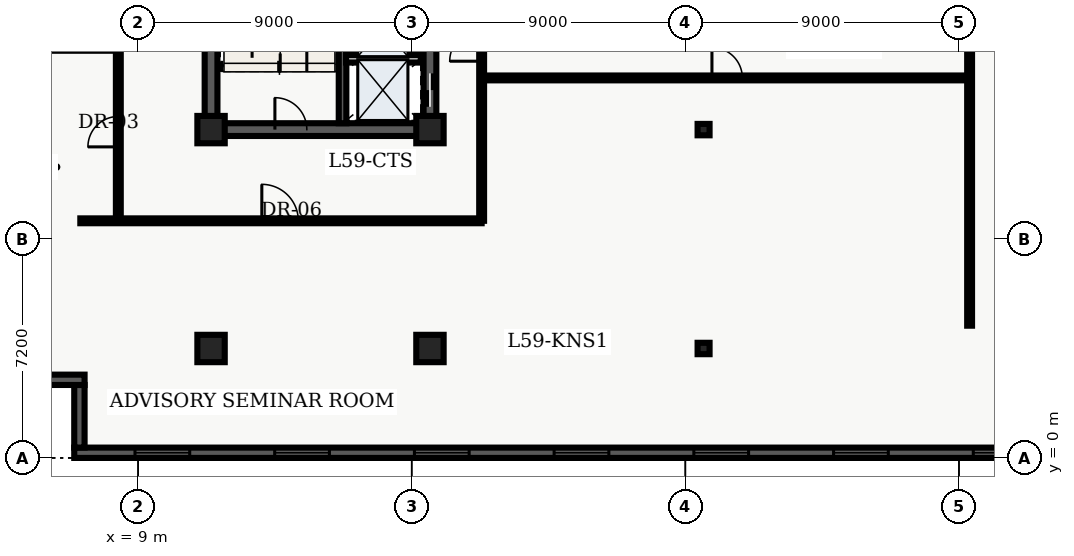
"""IFC4 building model, lengths in metres.
Left out: names, types, materials, properties, quantities, classifications, styles, units other than length and angle.
Written with IfcOpenShell. Run it as: python <this file> out.ifc"""

import sys

from ifc_helpers import new_model, entity, si_unit, converted_unit, direction, frame, origin_with_axes, origin_2d_with_axis, place, context, subcontext, project, spatial, polyline, rectangle, i_section, outline, extrude, element, fill, save


model = new_model("IFC4")
c1 = context("Model", 3, precision=1e-05, world=origin_with_axes(), true_north=direction((0.0, 1.0)))
c2 = subcontext(c1, "Body", "Model", "MODEL_VIEW")
j1 = project(units=[si_unit("LENGTHUNIT", "METRE"), converted_unit("PLANEANGLEUNIT", "DEGREE", entity("IfcPlaneAngleMeasure", 0.017), si_unit("PLANEANGLEUNIT", "RADIAN"), dimensions=[0, 0, 0, 0, 0, 0, 0])], contexts=[c1])
p1 = place(None, origin_with_axes())
s1 = spatial("IfcSite", under=j1, at=p1, CompositionType="ELEMENT")
p2 = place(p1, origin_with_axes())
s2 = spatial("IfcBuilding", under=s1, at=p2, CompositionType="ELEMENT")
p3 = place(p2, frame((0.0, 0.0, 240.3), z_axis=(0.0, 0.0, 1.0), x_axis=(1.0, 0.0, 0.0)))
s3 = spatial("IfcBuildingStorey", under=s2, at=p3, CompositionType="ELEMENT", Elevation=240.3)
p4 = place(p3, frame((11.4, 10.8, 0.0), z_axis=(0.0, 0.0, 1.0), x_axis=(0.0, 1.0, 0.0)))
e1 = element("IfcWall", 1, at=p4, inside=s3, PredefinedType="SHEAR", context=c2, shape_type="SweptSolid", body=[
    extrude(outline(polyline([(0.0, -0.21), (27.0, -0.21), (27.0, 0.21), (0.0, 0.21), (0.0, -0.21)])), origin_with_axes(), (0.0, 0.0, 1.0), 3.66),
])
p5 = place(p3, frame((11.4, 10.8, 0.0), z_axis=(0.0, 0.0, 1.0), x_axis=(1.0, 0.0, 0.0)))
e2 = element("IfcWall", 2, at=p5, inside=s3, PredefinedType="SHEAR", context=c2, shape_type="SweptSolid", body=[
    extrude(outline(polyline([(0.0, -0.21), (7.2, -0.21), (7.2, 0.21), (0.0, 0.21), (0.0, -0.21)])), origin_with_axes(), (0.0, 0.0, 1.0), 3.66),
])
p6 = place(p5, frame((2.625, 0.0, 0.0), z_axis=(0.0, 0.0, 1.0), x_axis=(1.0, 0.0, 0.0)))
e3 = element("IfcOpeningElement", 3, at=p6, cuts=e2, PredefinedType="OPENING", context=c2, shape_type="SweptSolid", body=[
    extrude(rectangle(XDim=1.05, YDim=0.44, at=origin_2d_with_axis()), origin_with_axes(), (0.0, 0.0, 1.0), 2.15),
])
p7 = place(p3, frame((18.6, 10.8, 0.0), z_axis=(0.0, 0.0, 1.0), x_axis=(0.0, 1.0, 0.0)))
e4 = element("IfcWall", 4, at=p7, inside=s3, PredefinedType="SHEAR", context=c2, shape_type="SweptSolid", body=[
    extrude(outline(polyline([(0.0, -0.21), (13.5, -0.21), (13.5, 0.21), (0.0, 0.21), (0.0, -0.21)])), origin_with_axes(), (0.0, 0.0, 1.0), 3.66),
])
p8 = place(p7, frame((1.3, 0.0, 0.0), z_axis=(0.0, 0.0, 1.0), x_axis=(1.0, 0.0, 0.0)))
e5 = element("IfcOpeningElement", 5, at=p8, cuts=e4, PredefinedType="OPENING", context=c2, shape_type="SweptSolid", body=[
    extrude(rectangle(XDim=1.1, YDim=0.44, at=origin_2d_with_axis()), origin_with_axes(), (0.0, 0.0, 1.0), 2.15),
])
p9 = place(p7, frame((3.4, 0.0, 0.0), z_axis=(0.0, 0.0, 1.0), x_axis=(1.0, 0.0, 0.0)))
e6 = element("IfcOpeningElement", 6, at=p9, cuts=e4, PredefinedType="OPENING", context=c2, shape_type="SweptSolid", body=[
    extrude(rectangle(XDim=1.1, YDim=0.44, at=origin_2d_with_axis()), origin_with_axes(), (0.0, 0.0, 1.0), 2.15),
])
p10 = place(p7, frame((11.125, 0.0, 0.0), z_axis=(0.0, 0.0, 1.0), x_axis=(1.0, 0.0, 0.0)))
e7 = element("IfcOpeningElement", 7, at=p10, cuts=e4, PredefinedType="OPENING", context=c2, shape_type="SweptSolid", body=[
    extrude(rectangle(XDim=1.05, YDim=0.44, at=origin_2d_with_axis()), origin_with_axes(), (0.0, 0.0, 1.0), 2.15),
])
p11 = place(p7, frame((6.675, 0.0, 0.0), z_axis=(0.0, 0.0, 1.0), x_axis=(1.0, 0.0, 0.0)))
e8 = element("IfcOpeningElement", 8, at=p11, cuts=e4, PredefinedType="OPENING", context=c2, shape_type="SweptSolid", body=[
    extrude(rectangle(XDim=0.95, YDim=0.44, at=origin_2d_with_axis()), origin_with_axes(), (0.0, 0.0, 1.0), 2.15),
])
p12 = place(p3, frame((15.725, 11.01, 0.0), z_axis=(0.0, 0.0, 1.0), x_axis=(0.0, 1.0, 0.0)))
e9 = element("IfcWall", 9, at=p12, inside=s3, PredefinedType="SHEAR", context=c2, shape_type="SweptSolid", body=[
    extrude(outline(polyline([(0.0, -0.125), (8.69, -0.125), (8.69, 0.125), (0.0, 0.125), (0.0, -0.125)])), origin_with_axes(), (0.0, 0.0, 1.0), 3.66),
])
for number, where, z_axis, x_axis in (
    (10, (11.4, 3.6, 0.0), (0.0, 0.0, 1.0), (1.0, 0.0, 0.0)),
    (11, (11.4, 10.8, 0.0), (0.0, 0.0, 1.0), (1.0, 0.0, 0.0)),
    (12, (18.6, 3.6, 0.0), (0.0, 0.0, 1.0), (1.0, 0.0, 0.0)),
    (13, (18.6, 10.8, 0.0), (0.0, 0.0, 1.0), (1.0, 0.0, 0.0)),
):
    element("IfcColumn", number, at=place(p3, frame(where, z_axis=z_axis, x_axis=x_axis)), inside=s3, PredefinedType="COLUMN", context=c2, shape_type="SweptSolid", body=[
        extrude(rectangle(XDim=0.9, YDim=0.9, at=origin_2d_with_axis()), origin_with_axes(), (0.0, 0.0, 1.0), 3.9),
    ])
for number, where, z_axis, x_axis in (
    (14, (27.6, 3.6, 0.0), (0.0, 0.0, 1.0), (1.0, 0.0, 0.0)),
    (15, (27.6, 10.8, 0.0), (0.0, 0.0, 1.0), (1.0, 0.0, 0.0)),
):
    element("IfcColumn", number, at=place(p3, frame(where, z_axis=z_axis, x_axis=x_axis)), inside=s3, PredefinedType="COLUMN", context=c2, shape_type="SweptSolid", body=[
        extrude(i_section(OverallWidth=0.394, OverallDepth=0.375, WebThickness=0.017, FlangeThickness=0.028, FilletRadius=0.02, at=origin_2d_with_axis()), origin_with_axes(), (0.0, 0.0, 1.0), 3.9),
    ])
p13 = place(p3, frame((15.84, 13.13, 0.0), z_axis=(0.0, 0.0, 1.0), x_axis=(1.0, 0.0, 0.0)))
e16 = element("IfcWall", 16, at=p13, inside=s3, PredefinedType="SOLIDWALL", context=c2, shape_type="SweptSolid", body=[
    extrude(outline(polyline([(0.0, -0.125), (2.46, -0.125), (2.46, 0.125), (0.0, 0.125), (0.0, -0.125)])), origin_with_axes(), (0.0, 0.0, 1.0), 2.7),
])
p14 = place(p3, frame((7.1, 7.8, 0.0), z_axis=(0.0, 0.0, 1.0), x_axis=(1.0, 0.0, 0.0)))
e17 = element("IfcWall", 17, at=p14, inside=s3, PredefinedType="PARTITIONING", context=c2, shape_type="SweptSolid", body=[
    extrude(outline(polyline([(0.0, -0.08), (13.2, -0.08), (13.2, 0.08), (0.0, 0.08), (0.0, -0.08)])), origin_with_axes(), (0.0, 0.0, 1.0), 2.7),
])
p15 = place(p14, frame((6.57, 0.0, 0.0), z_axis=(0.0, 0.0, 1.0), x_axis=(1.0, 0.0, 0.0)))
e18 = element("IfcOpeningElement", 18, at=p15, cuts=e17, PredefinedType="OPENING", context=c2, shape_type="SweptSolid", body=[
    extrude(rectangle(XDim=1.2, YDim=0.18, at=origin_2d_with_axis()), origin_with_axes(), (0.0, 0.0, 1.0), 2.2),
])
p16 = place(p3, frame((20.3, 7.8, 0.0), z_axis=(0.0, 0.0, 1.0), x_axis=(0.0, 1.0, 0.0)))
e19 = element("IfcWall", 19, at=p16, inside=s3, PredefinedType="PARTITIONING", context=c2, shape_type="SweptSolid", body=[
    extrude(outline(polyline([(0.0, -0.08), (32.7, -0.08), (32.7, 0.08), (0.0, 0.08), (0.0, -0.08)])), origin_with_axes(), (0.0, 0.0, 1.0), 2.7),
])
p17 = place(p16, frame((14.55, 0.0, 0.0), z_axis=(0.0, 0.0, 1.0), x_axis=(1.0, 0.0, 0.0)))
e20 = element("IfcOpeningElement", 20, at=p17, cuts=e19, PredefinedType="OPENING", context=c2, shape_type="SweptSolid", body=[
    extrude(rectangle(XDim=0.9, YDim=0.18, at=origin_2d_with_axis()), origin_with_axes(), (0.0, 0.0, 1.0), 2.15),
])
p18 = place(p16, frame((18.86, 0.0, 0.0), z_axis=(0.0, 0.0, 1.0), x_axis=(1.0, 0.0, 0.0)))
e21 = element("IfcOpeningElement", 21, at=p18, cuts=e19, PredefinedType="OPENING", context=c2, shape_type="SweptSolid", body=[
    extrude(rectangle(XDim=1.0, YDim=0.18, at=origin_2d_with_axis()), origin_with_axes(), (0.0, 0.0, 1.0), 2.15),
])
p19 = place(p16, frame((24.276, 0.0, 0.0), z_axis=(0.0, 0.0, 1.0), x_axis=(1.0, 0.0, 0.0)))
e22 = element("IfcOpeningElement", 22, at=p19, cuts=e19, PredefinedType="OPENING", context=c2, shape_type="SweptSolid", body=[
    extrude(rectangle(XDim=1.0, YDim=0.18, at=origin_2d_with_axis()), origin_with_axes(), (0.0, 0.0, 1.0), 2.15),
])
p20 = place(p16, frame((27.491, 0.0, 0.0), z_axis=(0.0, 0.0, 1.0), x_axis=(1.0, 0.0, 0.0)))
e23 = element("IfcOpeningElement", 23, at=p20, cuts=e19, PredefinedType="OPENING", context=c2, shape_type="SweptSolid", body=[
    extrude(rectangle(XDim=1.0, YDim=0.18, at=origin_2d_with_axis()), origin_with_axes(), (0.0, 0.0, 1.0), 2.15),
])
p21 = place(p16, frame((5.775, 0.0, 0.0), z_axis=(0.0, 0.0, 1.0), x_axis=(1.0, 0.0, 0.0)))
e24 = element("IfcOpeningElement", 24, at=p21, cuts=e19, PredefinedType="OPENING", context=c2, shape_type="SweptSolid", body=[
    extrude(rectangle(XDim=1.05, YDim=0.18, at=origin_2d_with_axis()), origin_with_axes(), (0.0, 0.0, 1.0), 2.15),
])
p22 = place(p3, frame((8.35, 7.8, 0.0), z_axis=(0.0, 0.0, 1.0), x_axis=(0.0, 1.0, 0.0)))
e25 = element("IfcWall", 25, at=p22, inside=s3, PredefinedType="PARTITIONING", context=c2, shape_type="SweptSolid", body=[
    extrude(outline(polyline([(0.0, -0.08), (12.6, -0.08), (12.6, 0.08), (0.0, 0.08), (0.0, -0.08)])), origin_with_axes(), (0.0, 0.0, 1.0), 2.7),
])
p23 = place(p22, frame((2.932, 0.0, 0.0), z_axis=(0.0, 0.0, 1.0), x_axis=(1.0, 0.0, 0.0)))
e26 = element("IfcOpeningElement", 26, at=p23, cuts=e25, PredefinedType="OPENING", context=c2, shape_type="SweptSolid", body=[
    extrude(rectangle(XDim=1.0, YDim=0.18, at=origin_2d_with_axis()), origin_with_axes(), (0.0, 0.0, 1.0), 2.15),
])
p24 = place(p22, frame((9.127, 0.0, 0.0), z_axis=(0.0, 0.0, 1.0), x_axis=(1.0, 0.0, 0.0)))
e27 = element("IfcOpeningElement", 27, at=p24, cuts=e25, PredefinedType="OPENING", context=c2, shape_type="SweptSolid", body=[
    extrude(rectangle(XDim=1.0, YDim=0.18, at=origin_2d_with_axis()), origin_with_axes(), (0.0, 0.0, 1.0), 2.15),
])
p25 = place(p3, frame((20.3, 12.5, 0.0), z_axis=(0.0, 0.0, 1.0), x_axis=(1.0, 0.0, 0.0)))
e28 = element("IfcWall", 28, at=p25, inside=s3, PredefinedType="PARTITIONING", context=c2, shape_type="SweptSolid", body=[
    extrude(outline(polyline([(0.0, -0.08), (16.05, -0.08), (16.05, 0.08), (0.0, 0.08), (0.0, -0.08)])), origin_with_axes(), (0.0, 0.0, 1.0), 2.7),
])
p26 = place(p25, frame((8.075, 0.0, 0.0), z_axis=(0.0, 0.0, 1.0), x_axis=(1.0, 0.0, 0.0)))
e29 = element("IfcOpeningElement", 29, at=p26, cuts=e28, PredefinedType="OPENING", context=c2, shape_type="SweptSolid", body=[
    extrude(rectangle(XDim=1.0, YDim=0.18, at=origin_2d_with_axis()), origin_with_axes(), (0.0, 0.0, 1.0), 2.15),
])
p27 = place(p3, frame((36.35, 4.35, 0.0), z_axis=(0.0, 0.0, 1.0), x_axis=(0.0, 1.0, 0.0)))
e30 = element("IfcWall", 30, at=p27, inside=s3, PredefinedType="PARTITIONING", context=c2, shape_type="SweptSolid", body=[
    extrude(outline(polyline([(0.0, -0.08), (16.95, -0.08), (16.95, 0.08), (0.0, 0.08), (0.0, -0.08)])), origin_with_axes(), (0.0, 0.0, 1.0), 2.7),
])
p28 = place(p3, frame((49.46, 0.17, 0.0), z_axis=(0.0, 0.0, 1.0), x_axis=(-1.0, 0.0, 0.0)))
e31 = element("IfcWall", 31, at=p28, inside=s3, PredefinedType="SOLIDWALL", context=c2, shape_type="SweptSolid", body=[
    extrude(outline(polyline([(0.0, -0.17), (42.56, -0.17), (42.56, 0.17), (0.0, 0.17), (0.0, -0.17)])), origin_with_axes(), (0.0, 0.0, 1.0), 3.66),
])
p29 = place(p28, frame((2.898, 0.0, 0.45), z_axis=(0.0, 0.0, 1.0), x_axis=(1.0, 0.0, 0.0)))
e32 = element("IfcOpeningElement", 32, at=p29, cuts=e31, PredefinedType="OPENING", context=c2, shape_type="SweptSolid", body=[
    extrude(rectangle(XDim=1.8, YDim=0.36, at=origin_2d_with_axis()), origin_with_axes(), (0.0, 0.0, 1.0), 2.1),
])
p30 = place(p28, frame((7.493, 0.0, 0.45), z_axis=(0.0, 0.0, 1.0), x_axis=(1.0, 0.0, 0.0)))
e33 = element("IfcOpeningElement", 33, at=p30, cuts=e31, PredefinedType="OPENING", context=c2, shape_type="SweptSolid", body=[
    extrude(rectangle(XDim=1.8, YDim=0.36, at=origin_2d_with_axis()), origin_with_axes(), (0.0, 0.0, 1.0), 2.1),
])
p31 = place(p28, frame((12.089, 0.0, 0.45), z_axis=(0.0, 0.0, 1.0), x_axis=(1.0, 0.0, 0.0)))
e34 = element("IfcOpeningElement", 34, at=p31, cuts=e31, PredefinedType="OPENING", context=c2, shape_type="SweptSolid", body=[
    extrude(rectangle(XDim=1.8, YDim=0.36, at=origin_2d_with_axis()), origin_with_axes(), (0.0, 0.0, 1.0), 2.1),
])
p32 = place(p28, frame((16.684, 0.0, 0.45), z_axis=(0.0, 0.0, 1.0), x_axis=(1.0, 0.0, 0.0)))
e35 = element("IfcOpeningElement", 35, at=p32, cuts=e31, PredefinedType="OPENING", context=c2, shape_type="SweptSolid", body=[
    extrude(rectangle(XDim=1.8, YDim=0.36, at=origin_2d_with_axis()), origin_with_axes(), (0.0, 0.0, 1.0), 2.1),
])
p33 = place(p28, frame((21.28, 0.0, 0.45), z_axis=(0.0, 0.0, 1.0), x_axis=(1.0, 0.0, 0.0)))
e36 = element("IfcOpeningElement", 36, at=p33, cuts=e31, PredefinedType="OPENING", context=c2, shape_type="SweptSolid", body=[
    extrude(rectangle(XDim=1.8, YDim=0.36, at=origin_2d_with_axis()), origin_with_axes(), (0.0, 0.0, 1.0), 2.1),
])
p34 = place(p28, frame((25.876, 0.0, 0.45), z_axis=(0.0, 0.0, 1.0), x_axis=(1.0, 0.0, 0.0)))
e37 = element("IfcOpeningElement", 37, at=p34, cuts=e31, PredefinedType="OPENING", context=c2, shape_type="SweptSolid", body=[
    extrude(rectangle(XDim=1.8, YDim=0.36, at=origin_2d_with_axis()), origin_with_axes(), (0.0, 0.0, 1.0), 2.1),
])
p35 = place(p28, frame((30.471, 0.0, 0.45), z_axis=(0.0, 0.0, 1.0), x_axis=(1.0, 0.0, 0.0)))
e38 = element("IfcOpeningElement", 38, at=p35, cuts=e31, PredefinedType="OPENING", context=c2, shape_type="SweptSolid", body=[
    extrude(rectangle(XDim=1.8, YDim=0.36, at=origin_2d_with_axis()), origin_with_axes(), (0.0, 0.0, 1.0), 2.1),
])
p36 = place(p28, frame((35.067, 0.0, 0.45), z_axis=(0.0, 0.0, 1.0), x_axis=(1.0, 0.0, 0.0)))
e39 = element("IfcOpeningElement", 39, at=p36, cuts=e31, PredefinedType="OPENING", context=c2, shape_type="SweptSolid", body=[
    extrude(rectangle(XDim=1.8, YDim=0.36, at=origin_2d_with_axis()), origin_with_axes(), (0.0, 0.0, 1.0), 2.1),
])
p37 = place(p28, frame((39.662, 0.0, 0.45), z_axis=(0.0, 0.0, 1.0), x_axis=(1.0, 0.0, 0.0)))
e40 = element("IfcOpeningElement", 40, at=p37, cuts=e31, PredefinedType="OPENING", context=c2, shape_type="SweptSolid", body=[
    extrude(rectangle(XDim=1.8, YDim=0.36, at=origin_2d_with_axis()), origin_with_axes(), (0.0, 0.0, 1.0), 2.1),
])
p38 = place(p3, frame((7.07, 0.34, 0.0), z_axis=(0.0, 0.0, 1.0), x_axis=(0.0, 1.0, 0.0)))
e41 = element("IfcWall", 41, at=p38, inside=s3, PredefinedType="SOLIDWALL", context=c2, shape_type="SweptSolid", body=[
    extrude(outline(polyline([(0.0, -0.17), (2.06, -0.17), (2.06, 0.17), (0.0, 0.17), (0.0, -0.17)])), origin_with_axes(), (0.0, 0.0, 1.0), 3.66),
])
p39 = place(p3, frame((7.24, 2.57, 0.0), z_axis=(0.0, 0.0, 1.0), x_axis=(-1.0, 0.0, 0.0)))
e42 = element("IfcWall", 42, at=p39, inside=s3, PredefinedType="SOLIDWALL", context=c2, shape_type="SweptSolid", body=[
    extrude(outline(polyline([(0.0, -0.17), (2.74, -0.17), (2.74, 0.17), (0.0, 0.17), (0.0, -0.17)])), origin_with_axes(), (0.0, 0.0, 1.0), 3.66),
])
p40 = place(p7, frame((1.3, 0.0, 0.0), z_axis=(0.0, 0.0, 1.0), x_axis=(1.0, 0.0, 0.0)))
e43 = element("IfcDoor", 43, at=p40, inside=s3, OperationType="SLIDING_TO_LEFT", PredefinedType="DOOR", context=c2, shape_type="SweptSolid", body=[
    extrude(rectangle(XDim=1.1, YDim=0.09, at=origin_2d_with_axis()), origin_with_axes(), (0.0, 0.0, 1.0), 2.15),
])
fill(e5, e43)
p41 = place(p5, frame((2.625, 0.0, 0.0), z_axis=(0.0, 0.0, 1.0), x_axis=(1.0, 0.0, 0.0)))
e44 = element("IfcDoor", 44, at=p41, inside=s3, OperationType="SINGLE_SWING_LEFT", PredefinedType="DOOR", context=c2, shape_type="SweptSolid", body=[
    extrude(rectangle(XDim=1.05, YDim=0.09, at=origin_2d_with_axis()), origin_with_axes(), (0.0, 0.0, 1.0), 2.15),
])
fill(e3, e44)
p42 = place(p22, frame((2.932, 0.0, 0.0), z_axis=(0.0, 0.0, 1.0), x_axis=(1.0, 0.0, 0.0)))
e45 = element("IfcDoor", 45, at=p42, inside=s3, OperationType="SINGLE_SWING_LEFT", PredefinedType="DOOR", context=c2, shape_type="SweptSolid", body=[
    extrude(rectangle(XDim=1.0, YDim=0.09, at=origin_2d_with_axis()), origin_with_axes(), (0.0, 0.0, 1.0), 2.15),
])
fill(e26, e45)
p43 = place(p14, frame((6.57, 0.0, 0.0), z_axis=(0.0, 0.0, 1.0), x_axis=(1.0, 0.0, 0.0)))
e46 = element("IfcDoor", 46, at=p43, inside=s3, OperationType="SINGLE_SWING_LEFT", PredefinedType="DOOR", context=c2, shape_type="SweptSolid", body=[
    extrude(rectangle(XDim=1.2, YDim=0.09, at=origin_2d_with_axis()), origin_with_axes(), (0.0, 0.0, 1.0), 2.2),
])
fill(e18, e46)
p44 = place(p16, frame((5.775, 0.0, 0.0), z_axis=(0.0, 0.0, 1.0), x_axis=(1.0, 0.0, 0.0)))
e47 = element("IfcDoor", 47, at=p44, inside=s3, OperationType="SINGLE_SWING_LEFT", PredefinedType="DOOR", context=c2, shape_type="SweptSolid", body=[
    extrude(rectangle(XDim=1.05, YDim=0.09, at=origin_2d_with_axis()), origin_with_axes(), (0.0, 0.0, 1.0), 2.15),
])
fill(e24, e47)
p45 = place(p25, frame((8.075, 0.0, 0.0), z_axis=(0.0, 0.0, 1.0), x_axis=(1.0, 0.0, 0.0)))
e48 = element("IfcDoor", 48, at=p45, inside=s3, OperationType="SINGLE_SWING_LEFT", PredefinedType="DOOR", context=c2, shape_type="SweptSolid", body=[
    extrude(rectangle(XDim=1.0, YDim=0.09, at=origin_2d_with_axis()), origin_with_axes(), (0.0, 0.0, 1.0), 2.15),
])
fill(e29, e48)
p46 = place(p28, frame((12.089, 0.0, 0.45), z_axis=(0.0, 0.0, 1.0), x_axis=(1.0, 0.0, 0.0)))
e49 = element("IfcWindow", 49, at=p46, inside=s3, PredefinedType="WINDOW", context=c2, shape_type="SweptSolid", body=[
    extrude(rectangle(XDim=1.8, YDim=0.09, at=origin_2d_with_axis()), origin_with_axes(), (0.0, 0.0, 1.0), 2.1),
])
fill(e34, e49)
p47 = place(p28, frame((16.684, 0.0, 0.45), z_axis=(0.0, 0.0, 1.0), x_axis=(1.0, 0.0, 0.0)))
e50 = element("IfcWindow", 50, at=p47, inside=s3, PredefinedType="WINDOW", context=c2, shape_type="SweptSolid", body=[
    extrude(rectangle(XDim=1.8, YDim=0.09, at=origin_2d_with_axis()), origin_with_axes(), (0.0, 0.0, 1.0), 2.1),
])
fill(e35, e50)
p48 = place(p28, frame((21.28, 0.0, 0.45), z_axis=(0.0, 0.0, 1.0), x_axis=(1.0, 0.0, 0.0)))
e51 = element("IfcWindow", 51, at=p48, inside=s3, PredefinedType="WINDOW", context=c2, shape_type="SweptSolid", body=[
    extrude(rectangle(XDim=1.8, YDim=0.09, at=origin_2d_with_axis()), origin_with_axes(), (0.0, 0.0, 1.0), 2.1),
])
fill(e36, e51)
p49 = place(p28, frame((25.876, 0.0, 0.45), z_axis=(0.0, 0.0, 1.0), x_axis=(1.0, 0.0, 0.0)))
e52 = element("IfcWindow", 52, at=p49, inside=s3, PredefinedType="WINDOW", context=c2, shape_type="SweptSolid", body=[
    extrude(rectangle(XDim=1.8, YDim=0.09, at=origin_2d_with_axis()), origin_with_axes(), (0.0, 0.0, 1.0), 2.1),
])
fill(e37, e52)
p50 = place(p28, frame((30.471, 0.0, 0.45), z_axis=(0.0, 0.0, 1.0), x_axis=(1.0, 0.0, 0.0)))
e53 = element("IfcWindow", 53, at=p50, inside=s3, PredefinedType="WINDOW", context=c2, shape_type="SweptSolid", body=[
    extrude(rectangle(XDim=1.8, YDim=0.09, at=origin_2d_with_axis()), origin_with_axes(), (0.0, 0.0, 1.0), 2.1),
])
fill(e38, e53)
p51 = place(p28, frame((35.067, 0.0, 0.45), z_axis=(0.0, 0.0, 1.0), x_axis=(1.0, 0.0, 0.0)))
e54 = element("IfcWindow", 54, at=p51, inside=s3, PredefinedType="WINDOW", context=c2, shape_type="SweptSolid", body=[
    extrude(rectangle(XDim=1.8, YDim=0.09, at=origin_2d_with_axis()), origin_with_axes(), (0.0, 0.0, 1.0), 2.1),
])
fill(e39, e54)
p52 = place(p28, frame((39.662, 0.0, 0.45), z_axis=(0.0, 0.0, 1.0), x_axis=(1.0, 0.0, 0.0)))
e55 = element("IfcWindow", 55, at=p52, inside=s3, PredefinedType="WINDOW", context=c2, shape_type="SweptSolid", body=[
    extrude(rectangle(XDim=1.8, YDim=0.09, at=origin_2d_with_axis()), origin_with_axes(), (0.0, 0.0, 1.0), 2.1),
])
fill(e40, e55)
save(model, sys.argv[1])
